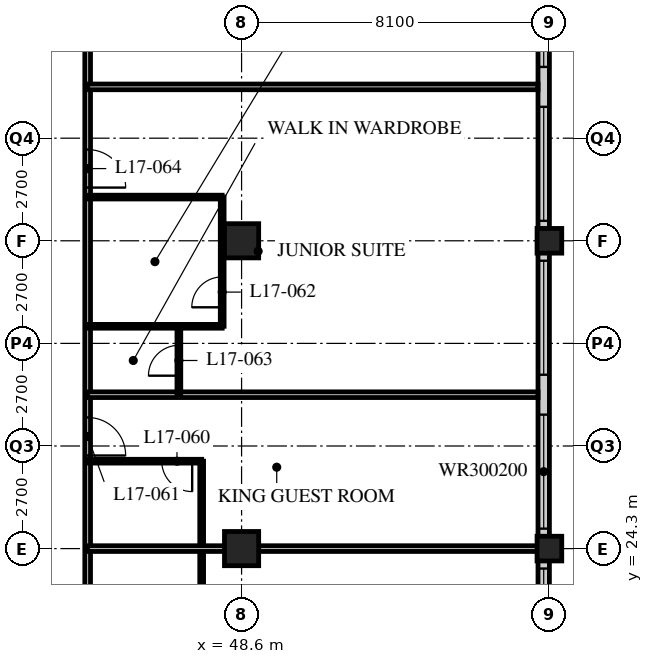
"""IFC4 building model, lengths in metres.
Left out: names, types, materials, properties, quantities, classifications, styles, units other than length and angle.
Written with IfcOpenShell. Run it as: python <this file> out.ifc"""

import sys

from ifc_helpers import new_model, si_unit, direction, frame, frame_2d, origin, origin_2d, place, context, subcontext, project, spatial, rectangle, hollow_rectangle, extrude, element, fill, save


model = new_model("IFC4")
c1 = context("Model", 3, precision=1e-05, world=origin(), true_north=direction((0.0, 1.0)))
c2 = subcontext(c1, "Body", "Model", "MODEL_VIEW")
j1 = project(units=[si_unit("LENGTHUNIT", "METRE"), si_unit("PLANEANGLEUNIT", "RADIAN")], contexts=[c1])
p1 = place(None, origin())
s1 = spatial("IfcSite", under=j1, at=p1, CompositionType="ELEMENT")
p2 = place(p1, origin())
s2 = spatial("IfcBuilding", under=s1, at=p2, CompositionType="ELEMENT")
p3 = place(p2, frame((0.0, 0.0, 70.4)))
s3 = spatial("IfcBuildingStorey", under=s2, at=p3, CompositionType="ELEMENT", Elevation=70.4)
for number, where, z_axis, x_axis in (
    (1, (48.6, 24.3, 0.0), (0.0, 0.0, 1.0), (1.0, 0.0, 0.0)),
    (2, (48.6, 32.4, 0.0), (0.0, 0.0, 1.0), (1.0, 0.0, 0.0)),
):
    element("IfcColumn", number, at=place(p3, frame(where, z_axis=z_axis, x_axis=x_axis)), inside=s3, PredefinedType="COLUMN", context=c2, shape_type="SweptSolid", body=[
        extrude(hollow_rectangle(XDim=0.9, YDim=0.9, WallThickness=0.09, at=origin_2d()), origin(), (0.0, 0.0, 1.0), 3.4),
    ])
for number, where, z_axis, x_axis in (
    (3, (56.7, 24.3, 0.0), (0.0, 0.0, 1.0), (1.0, 0.0, 0.0)),
    (4, (56.7, 32.4, 0.0), (0.0, 0.0, 1.0), (1.0, 0.0, 0.0)),
):
    element("IfcColumn", number, at=place(p3, frame(where, z_axis=z_axis, x_axis=x_axis)), inside=s3, PredefinedType="COLUMN", context=c2, shape_type="SweptSolid", body=[
        extrude(hollow_rectangle(XDim=0.65, YDim=0.65, WallThickness=0.05, at=origin_2d()), origin(), (0.0, 0.0, 1.0), 3.4),
    ])
p4 = place(p3, frame((56.55, 8.4, 0.0), z_axis=(0.0, 0.0, 1.0), x_axis=(0.0, 1.0, 0.0)))
e5 = element("IfcWall", 5, at=p4, inside=s3, PredefinedType="SOLIDWALL", context=c2, shape_type="SweptSolid", body=[
    extrude(rectangle(XDim=32.1, YDim=0.3, at=frame_2d((16.05, 0.0))), origin(), (0.0, 0.0, 1.0), 3.19),
])
p5 = place(p4, frame((0.225, 0.0, 0.9)))
e6 = element("IfcOpeningElement", 6, at=p5, cuts=e5, PredefinedType="OPENING", context=c2, shape_type="SweptSolid", body=[
    extrude(rectangle(XDim=3.0, YDim=2.0, at=frame_2d((1.5, 1.0))), frame((0.0, 0.16, 0.0), z_axis=(0.0, -1.0, 0.0), x_axis=(1.0, 0.0, 0.0)), (0.0, 0.0, 1.0), 0.32),
])
p6 = place(p4, frame((4.275, 0.0, 0.9)))
e7 = element("IfcOpeningElement", 7, at=p6, cuts=e5, PredefinedType="OPENING", context=c2, shape_type="SweptSolid", body=[
    extrude(rectangle(XDim=3.0, YDim=2.0, at=frame_2d((1.5, 1.0))), frame((0.0, 0.16, 0.0), z_axis=(0.0, -1.0, 0.0), x_axis=(1.0, 0.0, 0.0)), (0.0, 0.0, 1.0), 0.32),
])
p7 = place(p4, frame((8.325, 0.0, 0.9)))
e8 = element("IfcOpeningElement", 8, at=p7, cuts=e5, PredefinedType="OPENING", context=c2, shape_type="SweptSolid", body=[
    extrude(rectangle(XDim=3.0, YDim=2.0, at=frame_2d((1.5, 1.0))), frame((0.0, 0.16, 0.0), z_axis=(0.0, -1.0, 0.0), x_axis=(1.0, 0.0, 0.0)), (0.0, 0.0, 1.0), 0.32),
])
p8 = place(p4, frame((12.375, 0.0, 0.9)))
e9 = element("IfcOpeningElement", 9, at=p8, cuts=e5, PredefinedType="OPENING", context=c2, shape_type="SweptSolid", body=[
    extrude(rectangle(XDim=3.0, YDim=2.0, at=frame_2d((1.5, 1.0))), frame((0.0, 0.16, 0.0), z_axis=(0.0, -1.0, 0.0), x_axis=(1.0, 0.0, 0.0)), (0.0, 0.0, 1.0), 0.32),
])
p9 = place(p4, frame((16.425, 0.0, 0.9)))
e10 = element("IfcOpeningElement", 10, at=p9, cuts=e5, PredefinedType="OPENING", context=c2, shape_type="SweptSolid", body=[
    extrude(rectangle(XDim=3.0, YDim=2.0, at=frame_2d((1.5, 1.0))), frame((0.0, 0.16, 0.0), z_axis=(0.0, -1.0, 0.0), x_axis=(1.0, 0.0, 0.0)), (0.0, 0.0, 1.0), 0.32),
])
p10 = place(p4, frame((20.475, 0.0, 0.9)))
e11 = element("IfcOpeningElement", 11, at=p10, cuts=e5, PredefinedType="OPENING", context=c2, shape_type="SweptSolid", body=[
    extrude(rectangle(XDim=3.0, YDim=2.0, at=frame_2d((1.5, 1.0))), frame((0.0, 0.16, 0.0), z_axis=(0.0, -1.0, 0.0), x_axis=(1.0, 0.0, 0.0)), (0.0, 0.0, 1.0), 0.32),
])
p11 = place(p4, frame((24.525, 0.0, 0.9)))
e12 = element("IfcOpeningElement", 12, at=p11, cuts=e5, PredefinedType="OPENING", context=c2, shape_type="SweptSolid", body=[
    extrude(rectangle(XDim=3.0, YDim=2.0, at=frame_2d((1.5, 1.0))), frame((0.0, 0.16, 0.0), z_axis=(0.0, -1.0, 0.0), x_axis=(1.0, 0.0, 0.0)), (0.0, 0.0, 1.0), 0.32),
])
p12 = place(p4, frame((28.575, 0.0, 0.9)))
e13 = element("IfcOpeningElement", 13, at=p12, cuts=e5, PredefinedType="OPENING", context=c2, shape_type="SweptSolid", body=[
    extrude(rectangle(XDim=3.0, YDim=2.0, at=frame_2d((1.5, 1.0))), frame((0.0, 0.16, 0.0), z_axis=(0.0, -1.0, 0.0), x_axis=(1.0, 0.0, 0.0)), (0.0, 0.0, 1.0), 0.32),
])
p13 = place(p3, frame((44.55, 12.15, 0.0), z_axis=(0.0, 0.0, 1.0), x_axis=(0.0, 1.0, 0.0)))
e14 = element("IfcWall", 14, at=p13, inside=s3, PredefinedType="PARTITIONING", context=c2, shape_type="SweptSolid", body=[
    extrude(rectangle(XDim=30.15, YDim=0.15, at=frame_2d((15.075, 0.0))), origin(), (0.0, 0.0, 1.0), 3.19),
])
p14 = place(p13, frame((2.45, 0.0, 0.0)))
e15 = element("IfcOpeningElement", 15, at=p14, cuts=e14, PredefinedType="OPENING", context=c2, shape_type="SweptSolid", body=[
    extrude(rectangle(XDim=1.0, YDim=2.1, at=frame_2d((0.5, 1.05))), frame((0.0, 0.085, 0.0), z_axis=(0.0, -1.0, 0.0), x_axis=(1.0, 0.0, 0.0)), (0.0, 0.0, 1.0), 0.17),
])
p15 = place(p13, frame((4.35, 0.0, 0.0)))
e16 = element("IfcOpeningElement", 16, at=p15, cuts=e14, PredefinedType="OPENING", context=c2, shape_type="SweptSolid", body=[
    extrude(rectangle(XDim=1.0, YDim=2.1, at=frame_2d((0.5, 1.05))), frame((0.0, 0.085, 0.0), z_axis=(0.0, -1.0, 0.0), x_axis=(1.0, 0.0, 0.0)), (0.0, 0.0, 1.0), 0.17),
])
p16 = place(p13, frame((8.4, 0.0, 0.0)))
e17 = element("IfcOpeningElement", 17, at=p16, cuts=e14, PredefinedType="OPENING", context=c2, shape_type="SweptSolid", body=[
    extrude(rectangle(XDim=1.0, YDim=2.1, at=frame_2d((0.5, 1.05))), frame((0.0, 0.085, 0.0), z_axis=(0.0, -1.0, 0.0), x_axis=(1.0, 0.0, 0.0)), (0.0, 0.0, 1.0), 0.17),
])
p17 = place(p13, frame((14.6, 0.0, 0.0)))
e18 = element("IfcOpeningElement", 18, at=p17, cuts=e14, PredefinedType="OPENING", context=c2, shape_type="SweptSolid", body=[
    extrude(rectangle(XDim=1.0, YDim=2.1, at=frame_2d((0.5, 1.05))), frame((0.0, 0.085, 0.0), z_axis=(0.0, -1.0, 0.0), x_axis=(1.0, 0.0, 0.0)), (0.0, 0.0, 1.0), 0.17),
])
p18 = place(p13, frame((21.65, 0.0, 0.0)))
e19 = element("IfcOpeningElement", 19, at=p18, cuts=e14, PredefinedType="OPENING", context=c2, shape_type="SweptSolid", body=[
    extrude(rectangle(XDim=1.0, YDim=2.1, at=frame_2d((0.5, 1.05))), frame((0.0, 0.085, 0.0), z_axis=(0.0, -1.0, 0.0), x_axis=(1.0, 0.0, 0.0)), (0.0, 0.0, 1.0), 0.17),
])
p19 = place(p13, frame((26.7, 0.0, 0.0)))
e20 = element("IfcOpeningElement", 20, at=p19, cuts=e14, PredefinedType="OPENING", context=c2, shape_type="SweptSolid", body=[
    extrude(rectangle(XDim=1.0, YDim=2.1, at=frame_2d((0.5, 1.05))), frame((0.0, 0.085, 0.0), z_axis=(0.0, -1.0, 0.0), x_axis=(1.0, 0.0, 0.0)), (0.0, 0.0, 1.0), 0.17),
])
p20 = place(p3, frame((47.55, 21.7, 0.0), z_axis=(0.0, 0.0, 1.0), x_axis=(0.0, 1.0, 0.0)))
e21 = element("IfcWall", 21, at=p20, inside=s3, PredefinedType="PARTITIONING", context=c2, shape_type="SweptSolid", body=[
    extrude(rectangle(XDim=4.9, YDim=0.1, at=frame_2d((2.45, 0.0))), origin(), (0.0, 0.0, 1.0), 3.19),
])
p21 = place(p3, frame((44.55, 24.3, 0.0), z_axis=(0.0, 0.0, 1.0), x_axis=(1.0, 0.0, 0.0)))
e22 = element("IfcWall", 22, at=p21, inside=s3, PredefinedType="PARTITIONING", context=c2, shape_type="SweptSolid", body=[
    extrude(rectangle(XDim=11.85, YDim=0.15, at=frame_2d((5.925, 0.0))), origin(), (0.0, 0.0, 1.0), 2.578),
])
p22 = place(p3, frame((44.55, 26.6, 0.0), z_axis=(0.0, 0.0, 1.0), x_axis=(1.0, 0.0, 0.0)))
e23 = element("IfcWall", 23, at=p22, inside=s3, PredefinedType="PARTITIONING", context=c2, shape_type="SweptSolid", body=[
    extrude(rectangle(XDim=3.0, YDim=0.1, at=frame_2d((1.5, 0.0))), origin(), (0.0, 0.0, 1.0), 3.19),
])
p23 = place(p22, frame((1.95, 0.0, 0.0)))
e24 = element("IfcOpeningElement", 24, at=p23, cuts=e23, PredefinedType="OPENING", context=c2, shape_type="SweptSolid", body=[
    extrude(rectangle(XDim=0.8, YDim=2.1, at=frame_2d((0.4, 1.05))), frame((0.0, 0.06, 0.0), z_axis=(0.0, -1.0, 0.0), x_axis=(1.0, 0.0, 0.0)), (0.0, 0.0, 1.0), 0.12),
])
p24 = place(p3, frame((44.55, 28.35, 0.0), z_axis=(0.0, 0.0, 1.0), x_axis=(1.0, 0.0, 0.0)))
e25 = element("IfcWall", 25, at=p24, inside=s3, PredefinedType="PARTITIONING", context=c2, shape_type="SweptSolid", body=[
    extrude(rectangle(XDim=11.85, YDim=0.15, at=frame_2d((5.925, 0.0))), origin(), (0.0, 0.0, 1.0), 3.19),
])
p25 = place(p3, frame((48.09, 30.15, 0.0), z_axis=(0.0, 0.0, 1.0), x_axis=(0.0, 1.0, 0.0)))
e26 = element("IfcWall", 26, at=p25, inside=s3, PredefinedType="PARTITIONING", context=c2, shape_type="SweptSolid", body=[
    extrude(rectangle(XDim=3.4, YDim=0.1, at=frame_2d((1.7, 0.0))), origin(), (0.0, 0.0, 1.0), 3.19),
])
p26 = place(p25, frame((0.5, 0.0, 0.0)))
e27 = element("IfcOpeningElement", 27, at=p26, cuts=e26, PredefinedType="OPENING", context=c2, shape_type="SweptSolid", body=[
    extrude(rectangle(XDim=0.8, YDim=2.1, at=frame_2d((0.4, 1.05))), frame((0.0, 0.06, 0.0), z_axis=(0.0, -1.0, 0.0), x_axis=(1.0, 0.0, 0.0)), (0.0, 0.0, 1.0), 0.12),
])
p27 = place(p3, frame((46.95, 28.35, 0.0), z_axis=(0.0, 0.0, 1.0), x_axis=(0.0, 1.0, 0.0)))
e28 = element("IfcWall", 28, at=p27, inside=s3, PredefinedType="PARTITIONING", context=c2, shape_type="SweptSolid", body=[
    extrude(rectangle(XDim=1.8, YDim=0.1, at=frame_2d((0.9, 0.0))), origin(), (0.0, 0.0, 1.0), 3.19),
])
p28 = place(p27, frame((0.5, 0.0, 0.0)))
e29 = element("IfcOpeningElement", 29, at=p28, cuts=e28, PredefinedType="OPENING", context=c2, shape_type="SweptSolid", body=[
    extrude(rectangle(XDim=0.8, YDim=2.1, at=frame_2d((0.4, 1.05))), frame((0.0, 0.06, 0.0), z_axis=(0.0, -1.0, 0.0), x_axis=(1.0, 0.0, 0.0)), (0.0, 0.0, 1.0), 0.12),
])
for number, where, z_axis, x_axis in (
    (30, (44.55, 30.15, 0.0), (0.0, 0.0, 1.0), (1.0, 0.0, 0.0)),
    (31, (44.55, 33.55, 0.0), (0.0, 0.0, 1.0), (1.0, 0.0, 0.0)),
):
    element("IfcWall", number, at=place(p3, frame(where, z_axis=z_axis, x_axis=x_axis)), inside=s3, PredefinedType="PARTITIONING", context=c2, shape_type="SweptSolid", body=[
        extrude(rectangle(XDim=3.54, YDim=0.1, at=frame_2d((1.77, 0.0))), origin(), (0.0, 0.0, 1.0), 3.19),
    ])
p29 = place(p3, frame((44.55, 36.45, 0.0), z_axis=(0.0, 0.0, 1.0), x_axis=(1.0, 0.0, 0.0)))
e32 = element("IfcWall", 32, at=p29, inside=s3, PredefinedType="PARTITIONING", context=c2, shape_type="SweptSolid", body=[
    extrude(rectangle(XDim=11.85, YDim=0.15, at=frame_2d((5.925, 0.0))), origin(), (0.0, 0.0, 1.0), 3.19),
])
p30 = place(p8, origin())
e33 = element("IfcWindow", 33, at=p30, inside=s3, PartitioningType="SINGLE_PANEL", PredefinedType="WINDOW", context=c2, shape_type="SweptSolid", body=[
    extrude(rectangle(XDim=3.0, YDim=2.0, at=frame_2d((1.5, 1.0))), frame((0.0, 0.03, 0.0), z_axis=(0.0, -1.0, 0.0), x_axis=(1.0, 0.0, 0.0)), (0.0, 0.0, 1.0), 0.06),
])
fill(e9, e33)
p31 = place(p9, origin())
e34 = element("IfcWindow", 34, at=p31, inside=s3, PartitioningType="SINGLE_PANEL", PredefinedType="WINDOW", context=c2, shape_type="SweptSolid", body=[
    extrude(rectangle(XDim=3.0, YDim=2.0, at=frame_2d((1.5, 1.0))), frame((0.0, 0.03, 0.0), z_axis=(0.0, -1.0, 0.0), x_axis=(1.0, 0.0, 0.0)), (0.0, 0.0, 1.0), 0.06),
])
fill(e10, e34)
p32 = place(p10, origin())
e35 = element("IfcWindow", 35, at=p32, inside=s3, PartitioningType="SINGLE_PANEL", PredefinedType="WINDOW", context=c2, shape_type="SweptSolid", body=[
    extrude(rectangle(XDim=3.0, YDim=2.0, at=frame_2d((1.5, 1.0))), frame((0.0, 0.03, 0.0), z_axis=(0.0, -1.0, 0.0), x_axis=(1.0, 0.0, 0.0)), (0.0, 0.0, 1.0), 0.06),
])
fill(e11, e35)
p33 = place(p11, origin())
e36 = element("IfcWindow", 36, at=p33, inside=s3, PartitioningType="SINGLE_PANEL", PredefinedType="WINDOW", context=c2, shape_type="SweptSolid", body=[
    extrude(rectangle(XDim=3.0, YDim=2.0, at=frame_2d((1.5, 1.0))), frame((0.0, 0.03, 0.0), z_axis=(0.0, -1.0, 0.0), x_axis=(1.0, 0.0, 0.0)), (0.0, 0.0, 1.0), 0.06),
])
fill(e12, e36)
p34 = place(p12, origin())
e37 = element("IfcWindow", 37, at=p34, inside=s3, PartitioningType="SINGLE_PANEL", PredefinedType="WINDOW", context=c2, shape_type="SweptSolid", body=[
    extrude(rectangle(XDim=3.0, YDim=2.0, at=frame_2d((1.5, 1.0))), frame((0.0, 0.03, 0.0), z_axis=(0.0, -1.0, 0.0), x_axis=(1.0, 0.0, 0.0)), (0.0, 0.0, 1.0), 0.06),
])
fill(e13, e37)
p35 = place(p23, origin())
e38 = element("IfcDoor", 38, at=p35, inside=s3, OperationType="SINGLE_SWING_LEFT", PredefinedType="DOOR", context=c2, shape_type="SweptSolid", body=[
    extrude(rectangle(XDim=0.8, YDim=2.1, at=frame_2d((0.4, 1.05))), frame((0.0, 0.025, 0.0), z_axis=(0.0, -1.0, 0.0), x_axis=(1.0, 0.0, 0.0)), (0.0, 0.0, 1.0), 0.05),
])
fill(e24, e38)
p36 = place(p17, origin())
e39 = element("IfcDoor", 39, at=p36, inside=s3, OperationType="SINGLE_SWING_RIGHT", PredefinedType="DOOR", context=c2, shape_type="SweptSolid", body=[
    extrude(rectangle(XDim=1.0, YDim=2.1, at=frame_2d((0.5, 1.05))), frame((0.0, 0.025, 0.0), z_axis=(0.0, -1.0, 0.0), x_axis=(1.0, 0.0, 0.0)), (0.0, 0.0, 1.0), 0.05),
])
fill(e18, e39)
p37 = place(p26, origin())
e40 = element("IfcDoor", 40, at=p37, inside=s3, OperationType="SINGLE_SWING_LEFT", PredefinedType="DOOR", context=c2, shape_type="SweptSolid", body=[
    extrude(rectangle(XDim=0.8, YDim=2.1, at=frame_2d((0.4, 1.05))), frame((0.0, 0.025, 0.0), z_axis=(0.0, -1.0, 0.0), x_axis=(1.0, 0.0, 0.0)), (0.0, 0.0, 1.0), 0.05),
])
fill(e27, e40)
p38 = place(p28, origin())
e41 = element("IfcDoor", 41, at=p38, inside=s3, OperationType="SINGLE_SWING_LEFT", PredefinedType="DOOR", context=c2, shape_type="SweptSolid", body=[
    extrude(rectangle(XDim=0.8, YDim=2.1, at=frame_2d((0.4, 1.05))), frame((0.0, 0.025, 0.0), z_axis=(0.0, -1.0, 0.0), x_axis=(1.0, 0.0, 0.0)), (0.0, 0.0, 1.0), 0.05),
])
fill(e29, e41)
p39 = place(p18, origin())
e42 = element("IfcDoor", 42, at=p39, inside=s3, OperationType="SINGLE_SWING_RIGHT", PredefinedType="DOOR", context=c2, shape_type="SweptSolid", body=[
    extrude(rectangle(XDim=1.0, YDim=2.1, at=frame_2d((0.5, 1.05))), frame((0.0, 0.025, 0.0), z_axis=(0.0, -1.0, 0.0), x_axis=(1.0, 0.0, 0.0)), (0.0, 0.0, 1.0), 0.05),
])
fill(e19, e42)
save(model, sys.argv[1])
